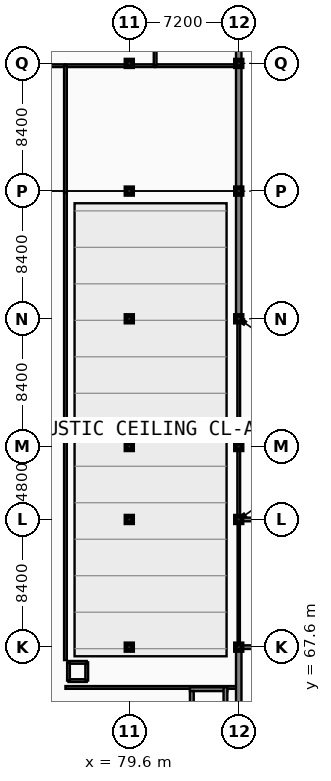
"""IFC4 building model, lengths in metres.
Left out: names, types, materials, properties, quantities, classifications, styles, units other than length and angle.
Written with IfcOpenShell. Run it as: python <this file> out.ifc"""

import sys

from ifc_helpers import new_model, si_unit, direction, frame, frame_2d, origin, origin_2d, place, context, subcontext, project, spatial, rectangle, extrude, element, fill, save


model = new_model("IFC4")
c1 = context("Model", 3, precision=1e-05, world=origin(), true_north=direction((0.0, 1.0)))
c2 = subcontext(c1, "Body", "Model", "MODEL_VIEW")
j1 = project(units=[si_unit("LENGTHUNIT", "METRE"), si_unit("PLANEANGLEUNIT", "RADIAN")], contexts=[c1])
p1 = place(None, origin())
s1 = spatial("IfcSite", under=j1, at=p1, CompositionType="ELEMENT")
p2 = place(p1, origin())
s2 = spatial("IfcBuilding", under=s1, at=p2, CompositionType="ELEMENT")
p3 = place(p2, frame((0.0, 0.0, 5.4)))
s3 = spatial("IfcBuildingStorey", under=s2, at=p3, CompositionType="ELEMENT", Elevation=5.4)
for number, where, z_axis, x_axis in (
    (1, (79.6, 67.6, 0.0), (0.0, 0.0, 1.0), (1.0, 0.0, 0.0)),
    (2, (79.6, 76.0, 0.0), (0.0, 0.0, 1.0), (1.0, 0.0, 0.0)),
    (3, (79.6, 80.8, 0.0), (0.0, 0.0, 1.0), (1.0, 0.0, 0.0)),
    (4, (79.6, 89.2, 0.0), (0.0, 0.0, 1.0), (1.0, 0.0, 0.0)),
    (5, (79.6, 97.6, 0.0), (0.0, 0.0, 1.0), (1.0, 0.0, 0.0)),
    (6, (79.6, 106.0, 0.0), (0.0, 0.0, 1.0), (1.0, 0.0, 0.0)),
    (7, (86.8, 67.6, 0.0), (0.0, 0.0, 1.0), (1.0, 0.0, 0.0)),
    (8, (86.8, 76.0, 0.0), (0.0, 0.0, 1.0), (1.0, 0.0, 0.0)),
    (9, (86.8, 80.8, 0.0), (0.0, 0.0, 1.0), (1.0, 0.0, 0.0)),
    (10, (86.8, 89.2, 0.0), (0.0, 0.0, 1.0), (1.0, 0.0, 0.0)),
    (11, (86.8, 97.6, 0.0), (0.0, 0.0, 1.0), (1.0, 0.0, 0.0)),
    (12, (86.8, 106.0, 0.0), (0.0, 0.0, 1.0), (1.0, 0.0, 0.0)),
):
    element("IfcColumn", number, at=place(p3, frame(where, z_axis=z_axis, x_axis=x_axis)), inside=s3, PredefinedType="COLUMN", context=c2, shape_type="SweptSolid", body=[
        extrude(rectangle(XDim=0.44, YDim=0.44, at=origin_2d()), origin(), (0.0, 0.0, 1.0), 4.2),
    ])
p4 = place(p3, frame((86.8, 67.6, 0.0), z_axis=(0.0, 0.0, 1.0), x_axis=(0.0, 1.0, 0.0)))
e13 = element("IfcWall", 13, at=p4, inside=s3, PredefinedType="PARTITIONING", context=c2, shape_type="SweptSolid", body=[
    extrude(rectangle(XDim=8.4, YDim=0.15, at=frame_2d((4.2, 0.0))), origin(), (0.0, 0.0, 1.0), 3.25),
])
p5 = place(p4, frame((3.7, 0.0, -0.01)))
e14 = element("IfcOpeningElement", 14, at=p5, cuts=e13, PredefinedType="OPENING", context=c2, shape_type="SweptSolid", body=[
    extrude(rectangle(XDim=1.0, YDim=2.16, at=frame_2d((0.5, 1.08))), frame((0.0, 0.085, 0.0), z_axis=(0.0, -1.0, 0.0), x_axis=(1.0, 0.0, 0.0)), (0.0, 0.0, 1.0), 0.17),
])
p6 = place(p3, frame((60.3, 105.85, 0.0), z_axis=(0.0, 0.0, 1.0), x_axis=(1.0, 0.0, 0.0)))
e15 = element("IfcWall", 15, at=p6, inside=s3, PredefinedType="PARTITIONING", context=c2, shape_type="SweptSolid", body=[
    extrude(rectangle(XDim=15.1, YDim=0.18, at=frame_2d((7.55, 0.0))), origin(), (0.0, 0.0, 1.0), 3.25),
])
p7 = place(p6, frame((7.05, 0.0, -0.01)))
e16 = element("IfcOpeningElement", 16, at=p7, cuts=e15, PredefinedType="OPENING", context=c2, shape_type="SweptSolid", body=[
    extrude(rectangle(XDim=1.0, YDim=2.16, at=frame_2d((0.5, 1.08))), frame((0.0, 0.1, 0.0), z_axis=(0.0, -1.0, 0.0), x_axis=(1.0, 0.0, 0.0)), (0.0, 0.0, 1.0), 0.2),
])
p8 = place(p3, frame((75.4, 105.85, 0.0), z_axis=(0.0, 0.0, 1.0), x_axis=(1.0, 0.0, 0.0)))
e17 = element("IfcWall", 17, at=p8, inside=s3, PredefinedType="PARTITIONING", context=c2, shape_type="SweptSolid", body=[
    extrude(rectangle(XDim=5.9, YDim=0.18, at=frame_2d((2.95, 0.0))), origin(), (0.0, 0.0, 1.0), 3.25),
])
p9 = place(p3, frame((81.3, 105.85, 0.0), z_axis=(0.0, 0.0, 1.0), x_axis=(1.0, 0.0, 0.0)))
e18 = element("IfcWall", 18, at=p9, inside=s3, PredefinedType="PARTITIONING", context=c2, shape_type="SweptSolid", body=[
    extrude(rectangle(XDim=5.36, YDim=0.18, at=frame_2d((2.68, 0.0))), origin(), (0.0, 0.0, 1.0), 3.25),
])
p10 = place(p9, frame((2.18, 0.0, -0.01)))
e19 = element("IfcOpeningElement", 19, at=p10, cuts=e18, PredefinedType="OPENING", context=c2, shape_type="SweptSolid", body=[
    extrude(rectangle(XDim=1.0, YDim=2.16, at=frame_2d((0.5, 1.08))), frame((0.0, 0.1, 0.0), z_axis=(0.0, -1.0, 0.0), x_axis=(1.0, 0.0, 0.0)), (0.0, 0.0, 1.0), 0.2),
])
p11 = place(p3, frame((81.3, 105.85, 0.0), z_axis=(0.0, 0.0, 1.0), x_axis=(0.0, 1.0, 0.0)))
e20 = element("IfcWall", 20, at=p11, inside=s3, PredefinedType="PARTITIONING", context=c2, shape_type="SweptSolid", body=[
    extrude(rectangle(XDim=4.15, YDim=0.18, at=frame_2d((2.075, 0.0))), origin(), (0.0, 0.0, 1.0), 3.25),
])
p12 = place(p11, frame((1.575, 0.0, -0.01)))
e21 = element("IfcOpeningElement", 21, at=p12, cuts=e20, PredefinedType="OPENING", context=c2, shape_type="SweptSolid", body=[
    extrude(rectangle(XDim=1.0, YDim=2.16, at=frame_2d((0.5, 1.08))), frame((0.0, 0.1, 0.0), z_axis=(0.0, -1.0, 0.0), x_axis=(1.0, 0.0, 0.0)), (0.0, 0.0, 1.0), 0.2),
])
p13 = place(p3, frame((75.4, 64.95, 0.0), z_axis=(0.0, 0.0, 1.0), x_axis=(1.0, 0.0, 0.0)))
e22 = element("IfcWall", 22, at=p13, inside=s3, PredefinedType="PARTITIONING", context=c2, shape_type="SweptSolid", body=[
    extrude(rectangle(XDim=11.26, YDim=0.18, at=frame_2d((5.63, 0.0))), origin(), (0.0, 0.0, 1.0), 3.37),
])
p14 = place(p3, frame((75.4, 66.75, 0.0), z_axis=(0.0, 0.0, 1.0), x_axis=(0.0, 1.0, 0.0)))
e23 = element("IfcWall", 23, at=p14, inside=s3, PredefinedType="PARTITIONING", context=c2, shape_type="SweptSolid", body=[
    extrude(rectangle(XDim=30.75, YDim=0.18, at=frame_2d((15.375, 0.0))), origin(), (0.0, 0.0, 1.0), 3.25),
])
p15 = place(p14, frame((6.413, 0.0, -0.01)))
e24 = element("IfcOpeningElement", 24, at=p15, cuts=e23, PredefinedType="OPENING", context=c2, shape_type="SweptSolid", body=[
    extrude(rectangle(XDim=1.6, YDim=2.21, at=frame_2d((0.8, 1.105))), frame((0.0, 0.1, 0.0), z_axis=(0.0, -1.0, 0.0), x_axis=(1.0, 0.0, 0.0)), (0.0, 0.0, 1.0), 0.2),
])
p16 = place(p3, frame((75.4, 97.5, 0.0), z_axis=(0.0, 0.0, 1.0), x_axis=(0.0, 1.0, 0.0)))
e25 = element("IfcWall", 25, at=p16, inside=s3, PredefinedType="PARTITIONING", context=c2, shape_type="SweptSolid", body=[
    extrude(rectangle(XDim=8.35, YDim=0.18, at=frame_2d((4.175, 0.0))), origin(), (0.0, 0.0, 1.0), 3.25),
])
p17 = place(p3, frame((86.8, 76.0, 0.0), z_axis=(0.0, 0.0, 1.0), x_axis=(0.0, 1.0, 0.0)))
e26 = element("IfcWall", 26, at=p17, inside=s3, PredefinedType="PARTITIONING", context=c2, shape_type="SweptSolid", body=[
    extrude(rectangle(XDim=13.2, YDim=0.18, at=frame_2d((6.6, 0.0))), origin(), (0.0, 0.0, 1.0), 3.25),
])
p18 = place(p17, frame((5.8, 0.0, -0.01)))
e27 = element("IfcOpeningElement", 27, at=p18, cuts=e26, PredefinedType="OPENING", context=c2, shape_type="SweptSolid", body=[
    extrude(rectangle(XDim=1.6, YDim=2.21, at=frame_2d((0.8, 1.105))), frame((0.0, 0.1, 0.0), z_axis=(0.0, -1.0, 0.0), x_axis=(1.0, 0.0, 0.0)), (0.0, 0.0, 1.0), 0.2),
])
p19 = place(p3, frame((86.8, 97.6, 0.0), z_axis=(0.0, 0.0, 1.0), x_axis=(0.0, 1.0, 0.0)))
e28 = element("IfcWall", 28, at=p19, inside=s3, PredefinedType="SOLIDWALL", context=c2, shape_type="SweptSolid", body=[
    extrude(rectangle(XDim=8.4, YDim=0.36, at=frame_2d((4.2, 0.0))), origin(), (0.0, 0.0, 1.0), 3.25),
])
p20 = place(p19, frame((0.46, 0.0, 0.75)))
e29 = element("IfcOpeningElement", 29, at=p20, cuts=e28, PredefinedType="OPENING", context=c2, shape_type="SweptSolid", body=[
    extrude(rectangle(XDim=1.55, YDim=2.36, at=frame_2d((0.775, 1.18))), frame((0.0, 0.19, 0.0), z_axis=(0.0, -1.0, 0.0), x_axis=(1.0, 0.0, 0.0)), (0.0, 0.0, 1.0), 0.38),
])
p21 = place(p19, frame((6.26, 0.0, 0.75)))
e30 = element("IfcOpeningElement", 30, at=p21, cuts=e28, PredefinedType="OPENING", context=c2, shape_type="SweptSolid", body=[
    extrude(rectangle(XDim=1.55, YDim=2.36, at=frame_2d((0.775, 1.18))), frame((0.0, 0.19, 0.0), z_axis=(0.0, -1.0, 0.0), x_axis=(1.0, 0.0, 0.0)), (0.0, 0.0, 1.0), 0.38),
])
p22 = place(p3, frame((86.8, 106.0, 0.0), z_axis=(0.0, 0.0, 1.0), x_axis=(0.0, 1.0, 0.0)))
e31 = element("IfcWall", 31, at=p22, inside=s3, PredefinedType="SOLIDWALL", context=c2, shape_type="SweptSolid", body=[
    extrude(rectangle(XDim=9.0, YDim=0.36, at=frame_2d((4.5, 0.0))), origin(), (0.0, 0.0, 1.0), 3.25),
])
p23 = place(p22, frame((0.46, 0.0, 0.75)))
e32 = element("IfcOpeningElement", 32, at=p23, cuts=e31, PredefinedType="OPENING", context=c2, shape_type="SweptSolid", body=[
    extrude(rectangle(XDim=1.55, YDim=2.36, at=frame_2d((0.775, 1.18))), frame((0.0, 0.19, 0.0), z_axis=(0.0, -1.0, 0.0), x_axis=(1.0, 0.0, 0.0)), (0.0, 0.0, 1.0), 0.38),
])
p24 = place(p22, frame((6.86, 0.0, 0.75)))
e33 = element("IfcOpeningElement", 33, at=p24, cuts=e31, PredefinedType="OPENING", context=c2, shape_type="SweptSolid", body=[
    extrude(rectangle(XDim=1.55, YDim=2.36, at=frame_2d((0.775, 1.18))), frame((0.0, 0.19, 0.0), z_axis=(0.0, -1.0, 0.0), x_axis=(1.0, 0.0, 0.0)), (0.0, 0.0, 1.0), 0.38),
])
p25 = place(p3, frame((86.8, 59.2, 0.0), z_axis=(0.0, 0.0, 1.0), x_axis=(0.0, 1.0, 0.0)))
e34 = element("IfcWall", 34, at=p25, inside=s3, PredefinedType="SOLIDWALL", context=c2, shape_type="SweptSolid", body=[
    extrude(rectangle(XDim=8.4, YDim=0.36, at=frame_2d((4.2, 0.0))), origin(), (0.0, 0.0, 1.0), 3.25),
])
p26 = place(p25, frame((0.46, 0.0, 0.75)))
e35 = element("IfcOpeningElement", 35, at=p26, cuts=e34, PredefinedType="OPENING", context=c2, shape_type="SweptSolid", body=[
    extrude(rectangle(XDim=1.55, YDim=2.36, at=frame_2d((0.775, 1.18))), frame((0.0, 0.19, 0.0), z_axis=(0.0, -1.0, 0.0), x_axis=(1.0, 0.0, 0.0)), (0.0, 0.0, 1.0), 0.38),
])
p27 = place(p25, frame((6.26, 0.0, 0.75)))
e36 = element("IfcOpeningElement", 36, at=p27, cuts=e34, PredefinedType="OPENING", context=c2, shape_type="SweptSolid", body=[
    extrude(rectangle(XDim=1.55, YDim=2.36, at=frame_2d((0.775, 1.18))), frame((0.0, 0.19, 0.0), z_axis=(0.0, -1.0, 0.0), x_axis=(1.0, 0.0, 0.0)), (0.0, 0.0, 1.0), 0.38),
])
p28 = place(p3, frame((86.8, 89.2, 0.0), z_axis=(0.0, 0.0, 1.0), x_axis=(0.0, 1.0, 0.0)))
e37 = element("IfcWall", 37, at=p28, inside=s3, PredefinedType="SOLIDWALL", context=c2, shape_type="SweptSolid", body=[
    extrude(rectangle(XDim=8.4, YDim=0.36, at=frame_2d((4.2, 0.0))), origin(), (0.0, 0.0, 1.0), 3.25),
])
p29 = place(p28, frame((0.46, 0.0, 0.75)))
e38 = element("IfcOpeningElement", 38, at=p29, cuts=e37, PredefinedType="OPENING", context=c2, shape_type="SweptSolid", body=[
    extrude(rectangle(XDim=1.55, YDim=2.36, at=frame_2d((0.775, 1.18))), frame((0.0, 0.19, 0.0), z_axis=(0.0, -1.0, 0.0), x_axis=(1.0, 0.0, 0.0)), (0.0, 0.0, 1.0), 0.38),
])
p30 = place(p28, frame((6.26, 0.0, 0.75)))
e39 = element("IfcOpeningElement", 39, at=p30, cuts=e37, PredefinedType="OPENING", context=c2, shape_type="SweptSolid", body=[
    extrude(rectangle(XDim=1.55, YDim=2.36, at=frame_2d((0.775, 1.18))), frame((0.0, 0.19, 0.0), z_axis=(0.0, -1.0, 0.0), x_axis=(1.0, 0.0, 0.0)), (0.0, 0.0, 1.0), 0.38),
])
for number, where, z_axis, x_axis in (
    (40, (87.03, 76.159, 0.0), (0.0, 0.0, 1.0), (0.822, 0.569, 0.0)),
    (41, (87.211, 88.915, 0.0), (0.0, 0.0, 1.0), (-0.822, 0.569, 0.0)),
):
    element("IfcWall", number, at=place(p3, frame(where, z_axis=z_axis, x_axis=x_axis)), inside=s3, PredefinedType="SOLIDWALL", context=c2, shape_type="SweptSolid", body=[
        extrude(rectangle(XDim=0.22, YDim=0.24, at=frame_2d((0.11, 0.0))), origin(), (0.0, 0.0, 1.0), 3.25),
    ])
for number, where, z_axis, x_axis in (
    (42, (86.8, 67.6, 0.0), (0.0, 0.0, 1.0), (1.0, 0.0, 0.0)),
    (43, (88.2, 76.0, 0.0), (0.0, 0.0, 1.0), (-1.0, 0.0, 0.0)),
):
    element("IfcWall", number, at=place(p3, frame(where, z_axis=z_axis, x_axis=x_axis)), inside=s3, PredefinedType="SOLIDWALL", context=c2, shape_type="SweptSolid", body=[
        extrude(rectangle(XDim=1.4, YDim=0.24, at=frame_2d((0.7, 0.0))), origin(), (0.0, 0.0, 1.0), 3.25),
    ])
p31 = place(p3, frame((83.59, 64.835, 0.0), z_axis=(0.0, 0.0, 1.0), x_axis=(1.0, 0.0, 0.0)))
e44 = element("IfcWall", 44, at=p31, inside=s3, PredefinedType="SHEAR", context=c2, shape_type="SweptSolid", body=[
    extrude(rectangle(XDim=2.46, YDim=0.25, at=frame_2d((1.23, 0.0))), origin(), (0.0, 0.0, 1.0), 4.2),
])
p32 = place(p3, frame((83.715, 62.25, 0.0), z_axis=(0.0, 0.0, 1.0), x_axis=(0.0, 1.0, 0.0)))
e45 = element("IfcWall", 45, at=p32, inside=s3, PredefinedType="SHEAR", context=c2, shape_type="SweptSolid", body=[
    extrude(rectangle(XDim=2.46, YDim=0.25, at=frame_2d((1.23, 0.0))), origin(), (0.0, 0.0, 1.0), 4.2),
])
p33 = place(p32, frame((0.68, 0.0, -0.01)))
e46 = element("IfcOpeningElement", 46, at=p33, cuts=e45, PredefinedType="OPENING", context=c2, shape_type="SweptSolid", body=[
    extrude(rectangle(XDim=1.1, YDim=2.16, at=frame_2d((0.55, 1.08))), frame((0.0, 0.135, 0.0), z_axis=(0.0, -1.0, 0.0), x_axis=(1.0, 0.0, 0.0)), (0.0, 0.0, 1.0), 0.27),
])
p34 = place(p3, frame((85.925, 62.25, 0.0), z_axis=(0.0, 0.0, 1.0), x_axis=(0.0, 1.0, 0.0)))
e47 = element("IfcWall", 47, at=p34, inside=s3, PredefinedType="SHEAR", context=c2, shape_type="SweptSolid", body=[
    extrude(rectangle(XDim=2.71, YDim=0.25, at=frame_2d((1.355, 0.0))), origin(), (0.0, 0.0, 1.0), 4.2),
])
p35 = place(p3, frame((75.6, 65.4, 0.0), z_axis=(0.0, 0.0, 1.0), x_axis=(1.0, 0.0, 0.0)))
e48 = element("IfcWall", 48, at=p35, inside=s3, PredefinedType="SOLIDWALL", context=c2, shape_type="SweptSolid", body=[
    extrude(rectangle(XDim=1.2, YDim=0.18, at=frame_2d((0.6, 0.0))), origin(), (0.0, 0.0, 1.0), 3.97),
])
p36 = place(p3, frame((76.8, 65.4, 0.0), z_axis=(0.0, 0.0, 1.0), x_axis=(0.0, 1.0, 0.0)))
e49 = element("IfcWall", 49, at=p36, inside=s3, PredefinedType="SOLIDWALL", context=c2, shape_type="SweptSolid", body=[
    extrude(rectangle(XDim=1.2, YDim=0.18, at=frame_2d((0.6, 0.0))), origin(), (0.0, 0.0, 1.0), 3.97),
])
p37 = place(p3, frame((76.8, 66.6, 0.0), z_axis=(0.0, 0.0, 1.0), x_axis=(-1.0, 0.0, 0.0)))
e50 = element("IfcWall", 50, at=p37, inside=s3, PredefinedType="SOLIDWALL", context=c2, shape_type="SweptSolid", body=[
    extrude(rectangle(XDim=1.2, YDim=0.18, at=frame_2d((0.6, 0.0))), origin(), (0.0, 0.0, 1.0), 3.97),
])
p38 = place(p3, frame((75.6, 66.6, 0.0), z_axis=(0.0, 0.0, 1.0), x_axis=(0.0, -1.0, 0.0)))
e51 = element("IfcWall", 51, at=p38, inside=s3, PredefinedType="SOLIDWALL", context=c2, shape_type="SweptSolid", body=[
    extrude(rectangle(XDim=1.2, YDim=0.18, at=frame_2d((0.6, 0.0))), origin(), (0.0, 0.0, 1.0), 3.97),
])
p39 = place(p38, frame((0.2, 0.0, -0.01)))
e52 = element("IfcOpeningElement", 52, at=p39, cuts=e51, PredefinedType="OPENING", context=c2, shape_type="SweptSolid", body=[
    extrude(rectangle(XDim=0.8, YDim=2.06, at=frame_2d((0.4, 1.03))), frame((0.0, 0.1, 0.0), z_axis=(0.0, -1.0, 0.0), x_axis=(1.0, 0.0, 0.0)), (0.0, 0.0, 1.0), 0.2),
])
p40 = place(p5, frame((0.0, 0.0, 0.01)))
e53 = element("IfcDoor", 53, at=p40, inside=s3, OperationType="SINGLE_SWING_LEFT", PredefinedType="DOOR", context=c2, shape_type="SweptSolid", body=[
    extrude(rectangle(XDim=1.0, YDim=2.15, at=frame_2d((0.5, 1.075))), frame((0.0, 0.025, 0.0), z_axis=(0.0, -1.0, 0.0), x_axis=(1.0, 0.0, 0.0)), (0.0, 0.0, 1.0), 0.05),
])
fill(e14, e53)
p41 = place(p10, frame((0.0, 0.0, 0.01)))
e54 = element("IfcDoor", 54, at=p41, inside=s3, OperationType="SINGLE_SWING_LEFT", PredefinedType="DOOR", context=c2, shape_type="SweptSolid", body=[
    extrude(rectangle(XDim=1.0, YDim=2.15, at=frame_2d((0.5, 1.075))), frame((0.0, 0.025, 0.0), z_axis=(0.0, -1.0, 0.0), x_axis=(1.0, 0.0, 0.0)), (0.0, 0.0, 1.0), 0.05),
])
fill(e19, e54)
p42 = place(p15, frame((0.0, 0.0, 0.01)))
e55 = element("IfcDoor", 55, at=p42, inside=s3, OperationType="DOUBLE_SWING_LEFT", PredefinedType="DOOR", context=c2, shape_type="SweptSolid", body=[
    extrude(rectangle(XDim=1.6, YDim=2.2, at=frame_2d((0.8, 1.1))), frame((0.0, 0.025, 0.0), z_axis=(0.0, -1.0, 0.0), x_axis=(1.0, 0.0, 0.0)), (0.0, 0.0, 1.0), 0.05),
])
fill(e24, e55)
p43 = place(p18, frame((1.6, 0.0, 0.01), z_axis=(0.0, 0.0, 1.0), x_axis=(-1.0, 0.0, 0.0)))
e56 = element("IfcDoor", 56, at=p43, inside=s3, OperationType="DOUBLE_SWING_LEFT", PredefinedType="DOOR", context=c2, shape_type="SweptSolid", body=[
    extrude(rectangle(XDim=1.6, YDim=2.2, at=frame_2d((0.8, 1.1))), frame((0.0, 0.025, 0.0), z_axis=(0.0, -1.0, 0.0), x_axis=(1.0, 0.0, 0.0)), (0.0, 0.0, 1.0), 0.05),
])
fill(e27, e56)
p44 = place(p20, origin())
e57 = element("IfcWindow", 57, at=p44, inside=s3, PartitioningType="DOUBLE_PANEL_HORIZONTAL", PredefinedType="WINDOW", context=c2, shape_type="SweptSolid", body=[
    extrude(rectangle(XDim=1.55, YDim=2.36, at=frame_2d((0.775, 1.18))), frame((0.0, 0.03, 0.0), z_axis=(0.0, -1.0, 0.0), x_axis=(1.0, 0.0, 0.0)), (0.0, 0.0, 1.0), 0.06),
])
fill(e29, e57)
p45 = place(p21, origin())
e58 = element("IfcWindow", 58, at=p45, inside=s3, PartitioningType="DOUBLE_PANEL_HORIZONTAL", PredefinedType="WINDOW", context=c2, shape_type="SweptSolid", body=[
    extrude(rectangle(XDim=1.55, YDim=2.36, at=frame_2d((0.775, 1.18))), frame((0.0, 0.03, 0.0), z_axis=(0.0, -1.0, 0.0), x_axis=(1.0, 0.0, 0.0)), (0.0, 0.0, 1.0), 0.06),
])
fill(e30, e58)
p46 = place(p23, origin())
e59 = element("IfcWindow", 59, at=p46, inside=s3, PartitioningType="DOUBLE_PANEL_HORIZONTAL", PredefinedType="WINDOW", context=c2, shape_type="SweptSolid", body=[
    extrude(rectangle(XDim=1.55, YDim=2.36, at=frame_2d((0.775, 1.18))), frame((0.0, 0.03, 0.0), z_axis=(0.0, -1.0, 0.0), x_axis=(1.0, 0.0, 0.0)), (0.0, 0.0, 1.0), 0.06),
])
fill(e32, e59)
p47 = place(p27, origin())
e60 = element("IfcWindow", 60, at=p47, inside=s3, PartitioningType="DOUBLE_PANEL_HORIZONTAL", PredefinedType="WINDOW", context=c2, shape_type="SweptSolid", body=[
    extrude(rectangle(XDim=1.55, YDim=2.36, at=frame_2d((0.775, 1.18))), frame((0.0, 0.03, 0.0), z_axis=(0.0, -1.0, 0.0), x_axis=(1.0, 0.0, 0.0)), (0.0, 0.0, 1.0), 0.06),
])
fill(e36, e60)
p48 = place(p29, origin())
e61 = element("IfcWindow", 61, at=p48, inside=s3, PartitioningType="DOUBLE_PANEL_HORIZONTAL", PredefinedType="WINDOW", context=c2, shape_type="SweptSolid", body=[
    extrude(rectangle(XDim=1.55, YDim=2.36, at=frame_2d((0.775, 1.18))), frame((0.0, 0.03, 0.0), z_axis=(0.0, -1.0, 0.0), x_axis=(1.0, 0.0, 0.0)), (0.0, 0.0, 1.0), 0.06),
])
fill(e38, e61)
p49 = place(p30, origin())
e62 = element("IfcWindow", 62, at=p49, inside=s3, PartitioningType="DOUBLE_PANEL_HORIZONTAL", PredefinedType="WINDOW", context=c2, shape_type="SweptSolid", body=[
    extrude(rectangle(XDim=1.55, YDim=2.36, at=frame_2d((0.775, 1.18))), frame((0.0, 0.03, 0.0), z_axis=(0.0, -1.0, 0.0), x_axis=(1.0, 0.0, 0.0)), (0.0, 0.0, 1.0), 0.06),
])
fill(e39, e62)
p50 = place(p39, frame((0.0, 0.0, 0.01)))
e63 = element("IfcDoor", 63, at=p50, inside=s3, OperationType="SINGLE_SWING_LEFT", PredefinedType="DOOR", context=c2, shape_type="SweptSolid", body=[
    extrude(rectangle(XDim=0.8, YDim=2.05, at=frame_2d((0.4, 1.025))), frame((0.0, 0.025, 0.0), z_axis=(0.0, -1.0, 0.0), x_axis=(1.0, 0.0, 0.0)), (0.0, 0.0, 1.0), 0.05),
])
fill(e52, e63)
save(model, sys.argv[1])
